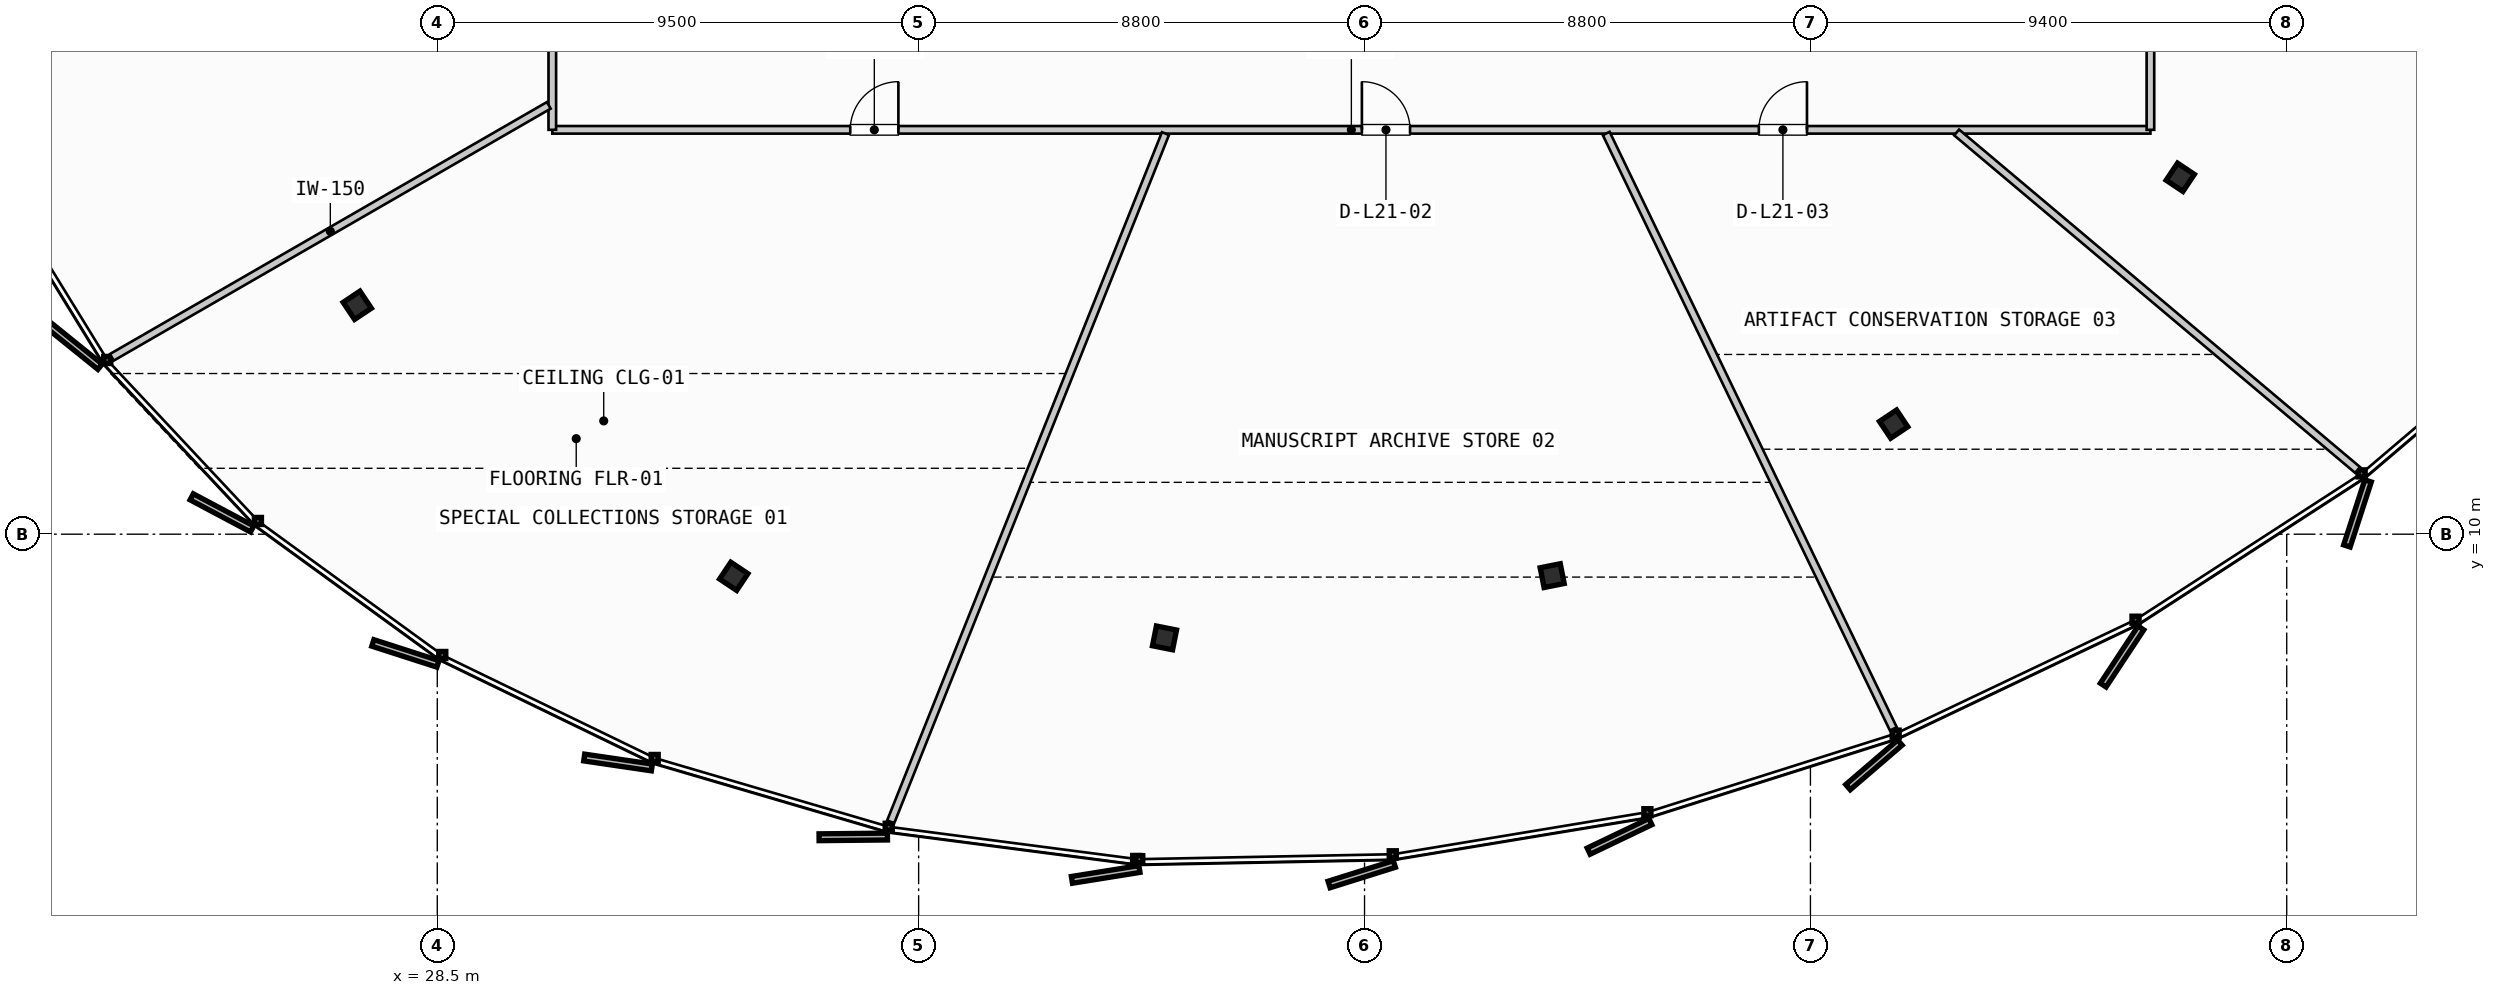
"""IFC4 building model, lengths in metres.
Left out: names, types, materials, properties, quantities, classifications, styles, units other than length and angle.
Written with IfcOpenShell. Run it as: python <this file> out.ifc"""

import sys

from ifc_helpers import new_model, si_unit, direction, frame, frame_2d, origin, origin_2d, place, context, subcontext, project, spatial, rectangle, i_section, extrude, source, transform, mapped, element, fill, save


model = new_model("IFC4")
c1 = context("Model", 3, precision=1e-05, world=origin(), true_north=direction((0.0, 1.0)))
c2 = subcontext(c1, "Body", "Model", "MODEL_VIEW")
j1 = project(units=[si_unit("LENGTHUNIT", "METRE"), si_unit("PLANEANGLEUNIT", "RADIAN")], contexts=[c1])
p1 = place(None, origin())
s1 = spatial("IfcSite", under=j1, at=p1, CompositionType="ELEMENT")
p2 = place(p1, origin())
s2 = spatial("IfcBuilding", under=s1, at=p2, CompositionType="ELEMENT")
p3 = place(p2, frame((0.0, 0.0, 89.2)))
s3 = spatial("IfcBuildingStorey", under=s2, at=p3, CompositionType="ELEMENT", Elevation=89.2)
m1 = source(origin(), c2, "Body", "SweptSolid", [
    extrude(i_section(OverallWidth=0.405, OverallDepth=0.398, WebThickness=0.035, FlangeThickness=0.056, FilletRadius=0.015, at=origin_2d()), origin(), (0.0, 0.0, 1.0), 3.35),
])
for number, where, z_axis, x_axis in (
    (1, (26.921, 14.517, 0.0), (0.0, 0.0, 1.0), (-0.831, -0.556, 0.0)),
    (2, (34.351, 9.168, 0.0), (0.0, 0.0, 1.0), (-0.556, -0.831, 0.0)),
    (3, (42.852, 7.954, 0.0), (0.0, 0.0, 1.0), (-0.195, -0.981, 0.0)),
    (4, (50.503, 9.182, 0.0), (0.0, 0.0, 1.0), (0.195, -0.981, 0.0)),
    (5, (57.242, 12.172, 0.0), (0.0, 0.0, 1.0), (0.556, -0.831, 0.0)),
    (6, (62.899, 17.043, 0.0), (0.0, 0.0, 1.0), (0.831, -0.556, 0.0)),
):
    element("IfcColumn", number, at=place(p3, frame(where, z_axis=z_axis, x_axis=x_axis)), inside=s3, PredefinedType="COLUMN", context=c2, shape_type="MappedRepresentation", body=[
        mapped(m1, transform((0.0, 0.0, 0.0), scale=1.0)),
    ])
p4 = place(p3, frame((30.77, 17.98, 0.0), z_axis=(0.0, 0.0, 1.0), x_axis=(1.0, 0.0, 0.0)))
e7 = element("IfcWall", 7, at=p4, inside=s3, PredefinedType="PARTITIONING", context=c2, shape_type="SweptSolid", body=[
    extrude(rectangle(XDim=31.54, YDim=0.15, at=frame_2d((15.77, 0.0))), origin(), (0.0, 0.0, 1.0), 2.28),
])
p5 = place(p4, frame((5.88, 0.0, 0.0)))
e8 = element("IfcOpeningElement", 8, at=p5, cuts=e7, PredefinedType="OPENING", context=c2, shape_type="SweptSolid", body=[
    extrude(rectangle(XDim=0.95, YDim=2.15, at=frame_2d((0.475, 1.075))), frame((0.0, 0.085, 0.0), z_axis=(0.0, -1.0, 0.0), x_axis=(1.0, 0.0, 0.0)), (0.0, 0.0, 1.0), 0.17),
])
p6 = place(p4, frame((15.978, 0.0, 0.0)))
e9 = element("IfcOpeningElement", 9, at=p6, cuts=e7, PredefinedType="OPENING", context=c2, shape_type="SweptSolid", body=[
    extrude(rectangle(XDim=0.95, YDim=2.15, at=frame_2d((0.475, 1.075))), frame((0.0, 0.085, 0.0), z_axis=(0.0, -1.0, 0.0), x_axis=(1.0, 0.0, 0.0)), (0.0, 0.0, 1.0), 0.17),
])
p7 = place(p4, frame((23.812, 0.0, 0.0)))
e10 = element("IfcOpeningElement", 10, at=p7, cuts=e7, PredefinedType="OPENING", context=c2, shape_type="SweptSolid", body=[
    extrude(rectangle(XDim=0.95, YDim=2.15, at=frame_2d((0.475, 1.075))), frame((0.0, 0.085, 0.0), z_axis=(0.0, -1.0, 0.0), x_axis=(1.0, 0.0, 0.0)), (0.0, 0.0, 1.0), 0.17),
])
p8 = place(p3, frame((62.31, 17.98, 0.0), z_axis=(0.0, 0.0, 1.0), x_axis=(0.0, 1.0, 0.0)))
e11 = element("IfcWall", 11, at=p8, inside=s3, PredefinedType="PARTITIONING", context=c2, shape_type="SweptSolid", body=[
    extrude(rectangle(XDim=20.06, YDim=0.15, at=frame_2d((10.03, 0.0))), origin(), (0.0, 0.0, 1.0), 2.28),
])
p9 = place(p8, frame((4.519, 0.0, 0.0)))
e12 = element("IfcOpeningElement", 12, at=p9, cuts=e11, PredefinedType="OPENING", context=c2, shape_type="SweptSolid", body=[
    extrude(rectangle(XDim=0.95, YDim=2.15, at=frame_2d((0.475, 1.075))), frame((0.0, 0.085, 0.0), z_axis=(0.0, -1.0, 0.0), x_axis=(1.0, 0.0, 0.0)), (0.0, 0.0, 1.0), 0.17),
])
p10 = place(p8, frame((13.969, 0.0, 0.0)))
e13 = element("IfcOpeningElement", 13, at=p10, cuts=e11, PredefinedType="OPENING", context=c2, shape_type="SweptSolid", body=[
    extrude(rectangle(XDim=0.95, YDim=2.15, at=frame_2d((0.475, 1.075))), frame((0.0, 0.085, 0.0), z_axis=(0.0, -1.0, 0.0), x_axis=(1.0, 0.0, 0.0)), (0.0, 0.0, 1.0), 0.17),
])
p11 = place(p3, frame((30.77, 38.04, 0.0), z_axis=(0.0, 0.0, 1.0), x_axis=(0.0, -1.0, 0.0)))
e14 = element("IfcWall", 14, at=p11, inside=s3, PredefinedType="PARTITIONING", context=c2, shape_type="SweptSolid", body=[
    extrude(rectangle(XDim=20.06, YDim=0.15, at=frame_2d((10.03, 0.0))), origin(), (0.0, 0.0, 1.0), 2.28),
])
p12 = place(p11, frame((11.37, 0.0, 0.0)))
e15 = element("IfcOpeningElement", 15, at=p12, cuts=e14, PredefinedType="OPENING", context=c2, shape_type="SweptSolid", body=[
    extrude(rectangle(XDim=0.95, YDim=2.15, at=frame_2d((0.475, 1.075))), frame((0.0, 0.085, 0.0), z_axis=(0.0, -1.0, 0.0), x_axis=(1.0, 0.0, 0.0)), (0.0, 0.0, 1.0), 0.17),
])
p13 = place(p3, frame((30.701, 18.463, 0.0), z_axis=(0.0, 0.0, 1.0), x_axis=(-0.866312143149, -0.499503023647, 0.0)))
e16 = element("IfcWall", 16, at=p13, inside=s3, PredefinedType="PARTITIONING", context=c2, shape_type="SweptSolid", body=[
    extrude(rectangle(XDim=9.954, YDim=0.15, at=frame_2d((4.977, 0.0))), origin(), (0.0, 0.0, 1.0), 2.28),
])
p14 = place(p3, frame((42.871, 17.906, 0.0), z_axis=(0.0, 0.0, 1.0), x_axis=(-0.370800538724, -0.92871252844, 0.0)))
e17 = element("IfcWall", 17, at=p14, inside=s3, PredefinedType="PARTITIONING", context=c2, shape_type="SweptSolid", body=[
    extrude(rectangle(XDim=14.624, YDim=0.15, at=frame_2d((7.312, 0.0))), origin(), (0.0, 0.0, 1.0), 2.28),
])
p15 = place(p3, frame((51.57, 17.908, 0.0), z_axis=(0.0, 0.0, 1.0), x_axis=(0.434373756615, -0.900732723711, 0.0)))
e18 = element("IfcWall", 18, at=p15, inside=s3, PredefinedType="PARTITIONING", context=c2, shape_type="SweptSolid", body=[
    extrude(rectangle(XDim=13.045, YDim=0.15, at=frame_2d((6.522, 0.0))), origin(), (0.0, 0.0, 1.0), 2.28),
])
p16 = place(p3, frame((58.485, 17.928, 0.0), z_axis=(0.0, 0.0, 1.0), x_axis=(0.765056250886, -0.643963456247, 0.0)))
e19 = element("IfcWall", 19, at=p16, inside=s3, PredefinedType="PARTITIONING", context=c2, shape_type="SweptSolid", body=[
    extrude(rectangle(XDim=10.343, YDim=0.15, at=frame_2d((5.171, 0.0))), origin(), (0.0, 0.0, 1.0), 2.28),
])
m2 = source(origin(), c2, "Body", "SweptSolid", [
    extrude(rectangle(XDim=0.95, YDim=2.15, at=frame_2d((0.475, 1.075))), frame((0.0, 0.025, 0.0), z_axis=(0.0, -1.0, 0.0), x_axis=(1.0, 0.0, 0.0)), (0.0, 0.0, 1.0), 0.05),
])
p17 = place(p5, origin())
e20 = element("IfcDoor", 20, at=p17, inside=s3, OperationType="SINGLE_SWING_RIGHT", PredefinedType="DOOR", context=c2, shape_type="MappedRepresentation", body=[
    mapped(m2, transform((0.0, 0.0, 0.0), scale=1.0)),
])
fill(e8, e20)
p18 = place(p6, origin())
e21 = element("IfcDoor", 21, at=p18, inside=s3, OperationType="SINGLE_SWING_LEFT", PredefinedType="DOOR", context=c2, shape_type="MappedRepresentation", body=[
    mapped(m2, transform((0.0, 0.0, 0.0), scale=1.0)),
])
fill(e9, e21)
p19 = place(p7, origin())
e22 = element("IfcDoor", 22, at=p19, inside=s3, OperationType="SINGLE_SWING_RIGHT", PredefinedType="DOOR", context=c2, shape_type="MappedRepresentation", body=[
    mapped(m2, transform((0.0, 0.0, 0.0), scale=1.0)),
])
fill(e10, e22)
save(model, sys.argv[1])
